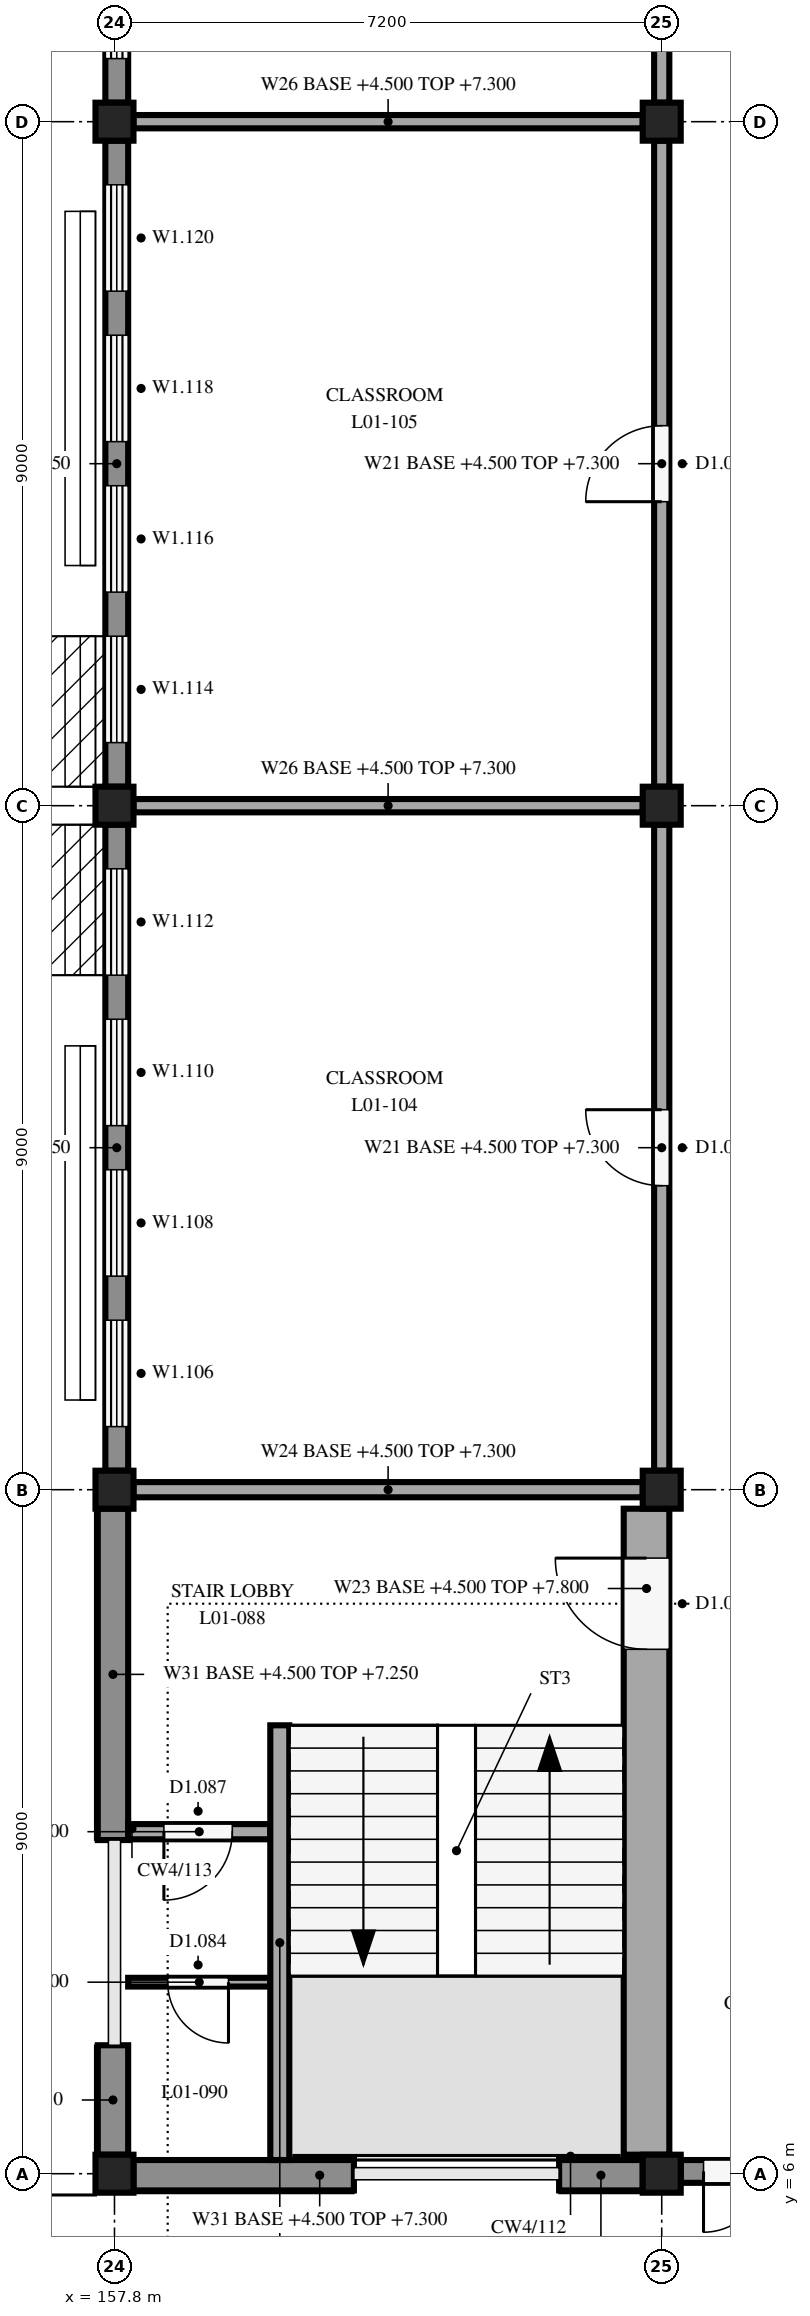
"""IFC4 building model, lengths in metres.
Left out: names, types, materials, properties, quantities, classifications, styles, units other than length and angle.
Written with IfcOpenShell. Run it as: python <this file> out.ifc"""

import sys

from ifc_helpers import new_model, si_unit, direction, frame, frame_2d, origin, origin_2d, place, context, subcontext, project, spatial, rectangle, extrude, element, fill, save


model = new_model("IFC4")
c1 = context("Model", 3, precision=1e-05, world=origin(), true_north=direction((0.0, 1.0)))
c2 = subcontext(c1, "Body", "Model", "MODEL_VIEW")
j1 = project(units=[si_unit("LENGTHUNIT", "METRE"), si_unit("PLANEANGLEUNIT", "RADIAN")], contexts=[c1])
p1 = place(None, origin())
s1 = spatial("IfcSite", under=j1, at=p1, CompositionType="ELEMENT")
p2 = place(p1, origin())
s2 = spatial("IfcBuilding", under=s1, at=p2, CompositionType="ELEMENT")
p3 = place(p2, frame((0.0, 0.0, 4.5)))
s3 = spatial("IfcBuildingStorey", under=s2, at=p3, CompositionType="ELEMENT", Elevation=4.5)
for number, where, z_axis, x_axis in (
    (1, (157.8, 6.0, 0.0), (0.0, 0.0, 1.0), (1.0, 0.0, 0.0)),
    (2, (157.8, 15.0, 0.0), (0.0, 0.0, 1.0), (1.0, 0.0, 0.0)),
    (3, (157.8, 24.0, 0.0), (0.0, 0.0, 1.0), (1.0, 0.0, 0.0)),
    (4, (157.8, 33.0, 0.0), (0.0, 0.0, 1.0), (1.0, 0.0, 0.0)),
    (5, (165.0, 6.0, 0.0), (0.0, 0.0, 1.0), (1.0, 0.0, 0.0)),
    (6, (165.0, 15.0, 0.0), (0.0, 0.0, 1.0), (1.0, 0.0, 0.0)),
    (7, (165.0, 24.0, 0.0), (0.0, 0.0, 1.0), (1.0, 0.0, 0.0)),
    (8, (165.0, 33.0, 0.0), (0.0, 0.0, 1.0), (1.0, 0.0, 0.0)),
):
    element("IfcColumn", number, at=place(p3, frame(where, z_axis=z_axis, x_axis=x_axis)), inside=s3, PredefinedType="COLUMN", context=c2, shape_type="SweptSolid", body=[
        extrude(rectangle(XDim=0.5, YDim=0.5, at=origin_2d()), origin(), (0.0, 0.0, 1.0), 3.3),
    ])
p4 = place(p3, frame((157.78, 6.25, 0.0), z_axis=(0.0, 0.0, 1.0), x_axis=(0.0, 1.0, 0.0)))
e9 = element("IfcWall", 9, at=p4, inside=s3, PredefinedType="STANDARD", context=c2, shape_type="SweptSolid", body=[
    extrude(rectangle(XDim=1.44, YDim=0.4, at=frame_2d((0.72, 0.0))), origin(), (0.0, 0.0, 1.0), 2.75),
])
p5 = place(p3, frame((157.78, 10.39, 0.0), z_axis=(0.0, 0.0, 1.0), x_axis=(0.0, 1.0, 0.0)))
e10 = element("IfcWall", 10, at=p5, inside=s3, PredefinedType="STANDARD", context=c2, shape_type="SweptSolid", body=[
    extrude(rectangle(XDim=4.36, YDim=0.4, at=frame_2d((2.18, 0.0))), origin(), (0.0, 0.0, 1.0), 2.75),
])
p6 = place(p3, frame((157.83, 15.25, 0.0), z_axis=(0.0, 0.0, 1.0), x_axis=(0.0, 1.0, 0.0)))
e11 = element("IfcWall", 11, at=p6, inside=s3, PredefinedType="STANDARD", context=c2, shape_type="SweptSolid", body=[
    extrude(rectangle(XDim=8.5, YDim=0.3, at=frame_2d((4.25, 0.0))), origin(), (0.0, 0.0, 1.0), 2.75),
])
p7 = place(p6, frame((0.58, 0.0, 0.6)))
e12 = element("IfcOpeningElement", 12, at=p7, cuts=e11, PredefinedType="OPENING", context=c2, shape_type="SweptSolid", body=[
    extrude(rectangle(XDim=1.4, YDim=2.1, at=frame_2d((0.7, 1.05))), frame((0.0, 0.16, 0.0), z_axis=(0.0, -1.0, 0.0), x_axis=(1.0, 0.0, 0.0)), (0.0, 0.0, 1.0), 0.32),
])
p8 = place(p6, frame((2.56, 0.0, 0.6)))
e13 = element("IfcOpeningElement", 13, at=p8, cuts=e11, PredefinedType="OPENING", context=c2, shape_type="SweptSolid", body=[
    extrude(rectangle(XDim=1.4, YDim=2.1, at=frame_2d((0.7, 1.05))), frame((0.0, 0.16, 0.0), z_axis=(0.0, -1.0, 0.0), x_axis=(1.0, 0.0, 0.0)), (0.0, 0.0, 1.0), 0.32),
])
p9 = place(p6, frame((4.54, 0.0, 0.6)))
e14 = element("IfcOpeningElement", 14, at=p9, cuts=e11, PredefinedType="OPENING", context=c2, shape_type="SweptSolid", body=[
    extrude(rectangle(XDim=1.4, YDim=2.1, at=frame_2d((0.7, 1.05))), frame((0.0, 0.16, 0.0), z_axis=(0.0, -1.0, 0.0), x_axis=(1.0, 0.0, 0.0)), (0.0, 0.0, 1.0), 0.32),
])
p10 = place(p6, frame((6.52, 0.0, 0.6)))
e15 = element("IfcOpeningElement", 15, at=p10, cuts=e11, PredefinedType="OPENING", context=c2, shape_type="SweptSolid", body=[
    extrude(rectangle(XDim=1.4, YDim=2.1, at=frame_2d((0.7, 1.05))), frame((0.0, 0.16, 0.0), z_axis=(0.0, -1.0, 0.0), x_axis=(1.0, 0.0, 0.0)), (0.0, 0.0, 1.0), 0.32),
])
p11 = place(p3, frame((157.83, 24.25, 0.0), z_axis=(0.0, 0.0, 1.0), x_axis=(0.0, 1.0, 0.0)))
e16 = element("IfcWall", 16, at=p11, inside=s3, PredefinedType="STANDARD", context=c2, shape_type="SweptSolid", body=[
    extrude(rectangle(XDim=8.5, YDim=0.3, at=frame_2d((4.25, 0.0))), origin(), (0.0, 0.0, 1.0), 2.75),
])
p12 = place(p11, frame((0.58, 0.0, 0.6)))
e17 = element("IfcOpeningElement", 17, at=p12, cuts=e16, PredefinedType="OPENING", context=c2, shape_type="SweptSolid", body=[
    extrude(rectangle(XDim=1.4, YDim=2.1, at=frame_2d((0.7, 1.05))), frame((0.0, 0.16, 0.0), z_axis=(0.0, -1.0, 0.0), x_axis=(1.0, 0.0, 0.0)), (0.0, 0.0, 1.0), 0.32),
])
p13 = place(p11, frame((2.56, 0.0, 0.6)))
e18 = element("IfcOpeningElement", 18, at=p13, cuts=e16, PredefinedType="OPENING", context=c2, shape_type="SweptSolid", body=[
    extrude(rectangle(XDim=1.4, YDim=2.1, at=frame_2d((0.7, 1.05))), frame((0.0, 0.16, 0.0), z_axis=(0.0, -1.0, 0.0), x_axis=(1.0, 0.0, 0.0)), (0.0, 0.0, 1.0), 0.32),
])
p14 = place(p11, frame((4.54, 0.0, 0.6)))
e19 = element("IfcOpeningElement", 19, at=p14, cuts=e16, PredefinedType="OPENING", context=c2, shape_type="SweptSolid", body=[
    extrude(rectangle(XDim=1.4, YDim=2.1, at=frame_2d((0.7, 1.05))), frame((0.0, 0.16, 0.0), z_axis=(0.0, -1.0, 0.0), x_axis=(1.0, 0.0, 0.0)), (0.0, 0.0, 1.0), 0.32),
])
p15 = place(p11, frame((6.52, 0.0, 0.6)))
e20 = element("IfcOpeningElement", 20, at=p15, cuts=e16, PredefinedType="OPENING", context=c2, shape_type="SweptSolid", body=[
    extrude(rectangle(XDim=1.4, YDim=2.1, at=frame_2d((0.7, 1.05))), frame((0.0, 0.16, 0.0), z_axis=(0.0, -1.0, 0.0), x_axis=(1.0, 0.0, 0.0)), (0.0, 0.0, 1.0), 0.32),
])
p16 = place(p3, frame((157.83, 33.25, 0.0), z_axis=(0.0, 0.0, 1.0), x_axis=(0.0, 1.0, 0.0)))
e21 = element("IfcWall", 21, at=p16, inside=s3, PredefinedType="STANDARD", context=c2, shape_type="SweptSolid", body=[
    extrude(rectangle(XDim=8.5, YDim=0.3, at=frame_2d((4.25, 0.0))), origin(), (0.0, 0.0, 1.0), 2.75),
])
p17 = place(p16, frame((0.58, 0.0, 0.6)))
e22 = element("IfcOpeningElement", 22, at=p17, cuts=e21, PredefinedType="OPENING", context=c2, shape_type="SweptSolid", body=[
    extrude(rectangle(XDim=1.4, YDim=2.1, at=frame_2d((0.7, 1.05))), frame((0.0, 0.16, 0.0), z_axis=(0.0, -1.0, 0.0), x_axis=(1.0, 0.0, 0.0)), (0.0, 0.0, 1.0), 0.32),
])
p18 = place(p16, frame((2.56, 0.0, 0.6)))
e23 = element("IfcOpeningElement", 23, at=p18, cuts=e21, PredefinedType="OPENING", context=c2, shape_type="SweptSolid", body=[
    extrude(rectangle(XDim=1.4, YDim=2.1, at=frame_2d((0.7, 1.05))), frame((0.0, 0.16, 0.0), z_axis=(0.0, -1.0, 0.0), x_axis=(1.0, 0.0, 0.0)), (0.0, 0.0, 1.0), 0.32),
])
p19 = place(p16, frame((4.54, 0.0, 0.6)))
e24 = element("IfcOpeningElement", 24, at=p19, cuts=e21, PredefinedType="OPENING", context=c2, shape_type="SweptSolid", body=[
    extrude(rectangle(XDim=1.4, YDim=2.1, at=frame_2d((0.7, 1.05))), frame((0.0, 0.16, 0.0), z_axis=(0.0, -1.0, 0.0), x_axis=(1.0, 0.0, 0.0)), (0.0, 0.0, 1.0), 0.32),
])
p20 = place(p16, frame((6.52, 0.0, 0.6)))
e25 = element("IfcOpeningElement", 25, at=p20, cuts=e21, PredefinedType="OPENING", context=c2, shape_type="SweptSolid", body=[
    extrude(rectangle(XDim=1.4, YDim=2.1, at=frame_2d((0.7, 1.05))), frame((0.0, 0.16, 0.0), z_axis=(0.0, -1.0, 0.0), x_axis=(1.0, 0.0, 0.0)), (0.0, 0.0, 1.0), 0.32),
])
p21 = place(p3, frame((160.95, 5.98, 0.0), z_axis=(0.0, 0.0, 1.0), x_axis=(-1.0, 0.0, 0.0)))
e26 = element("IfcWall", 26, at=p21, inside=s3, PredefinedType="STANDARD", context=c2, shape_type="SweptSolid", body=[
    extrude(rectangle(XDim=2.9, YDim=0.4, at=frame_2d((1.45, 0.0))), origin(), (0.0, 0.0, 1.0), 2.8),
])
p22 = place(p3, frame((164.75, 5.98, 0.0), z_axis=(0.0, 0.0, 1.0), x_axis=(-1.0, 0.0, 0.0)))
e27 = element("IfcWall", 27, at=p22, inside=s3, PredefinedType="STANDARD", context=c2, shape_type="SweptSolid", body=[
    extrude(rectangle(XDim=1.1, YDim=0.4, at=frame_2d((0.55, 0.0))), origin(), (0.0, 0.0, 1.0), 2.8),
])
p23 = place(p3, frame((167.45, 6.03, 0.0), z_axis=(0.0, 0.0, 1.0), x_axis=(-1.0, 0.0, 0.0)))
e28 = element("IfcWall", 28, at=p23, inside=s3, PredefinedType="STANDARD", context=c2, shape_type="SweptSolid", body=[
    extrude(rectangle(XDim=2.2, YDim=0.3, at=frame_2d((1.1, 0.0))), origin(), (0.0, 0.0, 1.0), 2.9),
])
p24 = place(p23, frame((0.3, 0.0, 0.0)))
e29 = element("IfcOpeningElement", 29, at=p24, cuts=e28, PredefinedType="OPENING", context=c2, shape_type="SweptSolid", body=[
    extrude(rectangle(XDim=1.6, YDim=2.4, at=frame_2d((0.8, 1.2))), frame((0.0, 0.16, 0.0), z_axis=(0.0, -1.0, 0.0), x_axis=(1.0, 0.0, 0.0)), (0.0, 0.0, 1.0), 0.32),
])
p25 = place(p3, frame((159.975, 6.18, 0.0), z_axis=(0.0, 0.0, 1.0), x_axis=(0.0, 1.0, 0.0)))
e30 = element("IfcWall", 30, at=p25, inside=s3, PredefinedType="SOLIDWALL", context=c2, shape_type="SweptSolid", body=[
    extrude(rectangle(XDim=5.72, YDim=0.25, at=frame_2d((2.86, 0.0))), origin(), (0.0, 0.0, 1.0), 3.3),
])
p26 = place(p3, frame((164.8, 6.25, 0.0), z_axis=(0.0, 0.0, 1.0), x_axis=(0.0, 1.0, 0.0)))
e31 = element("IfcWall", 31, at=p26, inside=s3, PredefinedType="SOLIDWALL", context=c2, shape_type="SweptSolid", body=[
    extrude(rectangle(XDim=8.5, YDim=0.6, at=frame_2d((4.25, 0.0))), origin(), (0.0, 0.0, 1.0), 3.3),
])
p27 = place(p26, frame((6.65, 0.0, 0.0)))
e32 = element("IfcOpeningElement", 32, at=p27, cuts=e31, PredefinedType="OPENING", context=c2, shape_type="SweptSolid", body=[
    extrude(rectangle(XDim=1.2, YDim=2.1, at=frame_2d((0.6, 1.05))), frame((0.0, 0.31, 0.0), z_axis=(0.0, -1.0, 0.0), x_axis=(1.0, 0.0, 0.0)), (0.0, 0.0, 1.0), 0.62),
])
p28 = place(p3, frame((159.85, 10.5, 0.0), z_axis=(0.0, 0.0, 1.0), x_axis=(-1.0, 0.0, 0.0)))
e33 = element("IfcWall", 33, at=p28, inside=s3, PredefinedType="SOLIDWALL", context=c2, shape_type="SweptSolid", body=[
    extrude(rectangle(XDim=1.87, YDim=0.2, at=frame_2d((0.935, 0.0))), origin(), (0.0, 0.0, 1.0), 3.3),
])
p29 = place(p28, frame((0.5, 0.0, 0.0)))
e34 = element("IfcOpeningElement", 34, at=p29, cuts=e33, PredefinedType="OPENING", context=c2, shape_type="SweptSolid", body=[
    extrude(rectangle(XDim=0.9, YDim=2.1, at=frame_2d((0.45, 1.05))), frame((0.0, 0.11, 0.0), z_axis=(0.0, -1.0, 0.0), x_axis=(1.0, 0.0, 0.0)), (0.0, 0.0, 1.0), 0.22),
])
p30 = place(p3, frame((159.85, 8.52, 0.0), z_axis=(0.0, 0.0, 1.0), x_axis=(-1.0, 0.0, 0.0)))
e35 = element("IfcWall", 35, at=p30, inside=s3, PredefinedType="PARTITIONING", context=c2, shape_type="SweptSolid", body=[
    extrude(rectangle(XDim=1.87, YDim=0.115, at=frame_2d((0.935, 0.0))), origin(), (0.0, 0.0, 1.0), 3.3),
])
p31 = place(p30, frame((0.55, 0.0, 0.0)))
e36 = element("IfcOpeningElement", 36, at=p31, cuts=e35, PredefinedType="OPENING", context=c2, shape_type="SweptSolid", body=[
    extrude(rectangle(XDim=0.8, YDim=2.1, at=frame_2d((0.4, 1.05))), frame((0.0, 0.067, 0.0), z_axis=(0.0, -1.0, 0.0), x_axis=(1.0, 0.0, 0.0)), (0.0, 0.0, 1.0), 0.135),
])
p32 = place(p3, frame((158.05, 15.0, 0.0), z_axis=(0.0, 0.0, 1.0), x_axis=(1.0, 0.0, 0.0)))
e37 = element("IfcWall", 37, at=p32, inside=s3, PredefinedType="SOLIDWALL", context=c2, shape_type="SweptSolid", body=[
    extrude(rectangle(XDim=6.7, YDim=0.2, at=frame_2d((3.35, 0.0))), origin(), (0.0, 0.0, 1.0), 2.8),
])
p33 = place(p3, frame((165.0, 15.25, 0.0), z_axis=(0.0, 0.0, 1.0), x_axis=(0.0, 1.0, 0.0)))
e38 = element("IfcWall", 38, at=p33, inside=s3, PredefinedType="PARTITIONING", context=c2, shape_type="SweptSolid", body=[
    extrude(rectangle(XDim=8.5, YDim=0.2, at=frame_2d((4.25, 0.0))), origin(), (0.0, 0.0, 1.0), 2.8),
])
p34 = place(p33, frame((3.75, 0.0, 0.0)))
e39 = element("IfcOpeningElement", 39, at=p34, cuts=e38, PredefinedType="OPENING", context=c2, shape_type="SweptSolid", body=[
    extrude(rectangle(XDim=1.0, YDim=2.1, at=frame_2d((0.5, 1.05))), frame((0.0, 0.11, 0.0), z_axis=(0.0, -1.0, 0.0), x_axis=(1.0, 0.0, 0.0)), (0.0, 0.0, 1.0), 0.22),
])
p35 = place(p3, frame((165.0, 24.25, 0.0), z_axis=(0.0, 0.0, 1.0), x_axis=(0.0, 1.0, 0.0)))
e40 = element("IfcWall", 40, at=p35, inside=s3, PredefinedType="PARTITIONING", context=c2, shape_type="SweptSolid", body=[
    extrude(rectangle(XDim=8.5, YDim=0.2, at=frame_2d((4.25, 0.0))), origin(), (0.0, 0.0, 1.0), 2.8),
])
p36 = place(p35, frame((3.75, 0.0, 0.0)))
e41 = element("IfcOpeningElement", 41, at=p36, cuts=e40, PredefinedType="OPENING", context=c2, shape_type="SweptSolid", body=[
    extrude(rectangle(XDim=1.0, YDim=2.1, at=frame_2d((0.5, 1.05))), frame((0.0, 0.11, 0.0), z_axis=(0.0, -1.0, 0.0), x_axis=(1.0, 0.0, 0.0)), (0.0, 0.0, 1.0), 0.22),
])
p37 = place(p3, frame((165.0, 33.25, 0.0), z_axis=(0.0, 0.0, 1.0), x_axis=(0.0, 1.0, 0.0)))
e42 = element("IfcWall", 42, at=p37, inside=s3, PredefinedType="PARTITIONING", context=c2, shape_type="SweptSolid", body=[
    extrude(rectangle(XDim=8.5, YDim=0.2, at=frame_2d((4.25, 0.0))), origin(), (0.0, 0.0, 1.0), 2.8),
])
p38 = place(p37, frame((3.75, 0.0, 0.0)))
e43 = element("IfcOpeningElement", 43, at=p38, cuts=e42, PredefinedType="OPENING", context=c2, shape_type="SweptSolid", body=[
    extrude(rectangle(XDim=1.0, YDim=2.1, at=frame_2d((0.5, 1.05))), frame((0.0, 0.11, 0.0), z_axis=(0.0, -1.0, 0.0), x_axis=(1.0, 0.0, 0.0)), (0.0, 0.0, 1.0), 0.22),
])
for number, where, z_axis, x_axis in (
    (44, (158.05, 24.0, 0.0), (0.0, 0.0, 1.0), (1.0, 0.0, 0.0)),
    (45, (158.05, 33.0, 0.0), (0.0, 0.0, 1.0), (1.0, 0.0, 0.0)),
):
    element("IfcWall", number, at=place(p3, frame(where, z_axis=z_axis, x_axis=x_axis)), inside=s3, PredefinedType="PARTITIONING", context=c2, shape_type="SweptSolid", body=[
        extrude(rectangle(XDim=6.7, YDim=0.175, at=frame_2d((3.35, 0.0))), origin(), (0.0, 0.0, 1.0), 2.8),
    ])
p39 = place(p7, origin())
e46 = element("IfcWindow", 46, at=p39, inside=s3, PartitioningType="DOUBLE_PANEL_VERTICAL", PredefinedType="WINDOW", context=c2, shape_type="SweptSolid", body=[
    extrude(rectangle(XDim=1.4, YDim=2.1, at=frame_2d((0.7, 1.05))), frame((0.0, 0.03, 0.0), z_axis=(0.0, -1.0, 0.0), x_axis=(1.0, 0.0, 0.0)), (0.0, 0.0, 1.0), 0.06),
])
fill(e12, e46)
p40 = place(p8, origin())
e47 = element("IfcWindow", 47, at=p40, inside=s3, PartitioningType="DOUBLE_PANEL_VERTICAL", PredefinedType="WINDOW", context=c2, shape_type="SweptSolid", body=[
    extrude(rectangle(XDim=1.4, YDim=2.1, at=frame_2d((0.7, 1.05))), frame((0.0, 0.03, 0.0), z_axis=(0.0, -1.0, 0.0), x_axis=(1.0, 0.0, 0.0)), (0.0, 0.0, 1.0), 0.06),
])
fill(e13, e47)
p41 = place(p9, origin())
e48 = element("IfcWindow", 48, at=p41, inside=s3, PartitioningType="DOUBLE_PANEL_VERTICAL", PredefinedType="WINDOW", context=c2, shape_type="SweptSolid", body=[
    extrude(rectangle(XDim=1.4, YDim=2.1, at=frame_2d((0.7, 1.05))), frame((0.0, 0.03, 0.0), z_axis=(0.0, -1.0, 0.0), x_axis=(1.0, 0.0, 0.0)), (0.0, 0.0, 1.0), 0.06),
])
fill(e14, e48)
p42 = place(p10, origin())
e49 = element("IfcWindow", 49, at=p42, inside=s3, PartitioningType="DOUBLE_PANEL_VERTICAL", PredefinedType="WINDOW", context=c2, shape_type="SweptSolid", body=[
    extrude(rectangle(XDim=1.4, YDim=2.1, at=frame_2d((0.7, 1.05))), frame((0.0, 0.03, 0.0), z_axis=(0.0, -1.0, 0.0), x_axis=(1.0, 0.0, 0.0)), (0.0, 0.0, 1.0), 0.06),
])
fill(e15, e49)
p43 = place(p12, origin())
e50 = element("IfcWindow", 50, at=p43, inside=s3, PartitioningType="DOUBLE_PANEL_VERTICAL", PredefinedType="WINDOW", context=c2, shape_type="SweptSolid", body=[
    extrude(rectangle(XDim=1.4, YDim=2.1, at=frame_2d((0.7, 1.05))), frame((0.0, 0.03, 0.0), z_axis=(0.0, -1.0, 0.0), x_axis=(1.0, 0.0, 0.0)), (0.0, 0.0, 1.0), 0.06),
])
fill(e17, e50)
p44 = place(p13, origin())
e51 = element("IfcWindow", 51, at=p44, inside=s3, PartitioningType="DOUBLE_PANEL_VERTICAL", PredefinedType="WINDOW", context=c2, shape_type="SweptSolid", body=[
    extrude(rectangle(XDim=1.4, YDim=2.1, at=frame_2d((0.7, 1.05))), frame((0.0, 0.03, 0.0), z_axis=(0.0, -1.0, 0.0), x_axis=(1.0, 0.0, 0.0)), (0.0, 0.0, 1.0), 0.06),
])
fill(e18, e51)
p45 = place(p14, origin())
e52 = element("IfcWindow", 52, at=p45, inside=s3, PartitioningType="DOUBLE_PANEL_VERTICAL", PredefinedType="WINDOW", context=c2, shape_type="SweptSolid", body=[
    extrude(rectangle(XDim=1.4, YDim=2.1, at=frame_2d((0.7, 1.05))), frame((0.0, 0.03, 0.0), z_axis=(0.0, -1.0, 0.0), x_axis=(1.0, 0.0, 0.0)), (0.0, 0.0, 1.0), 0.06),
])
fill(e19, e52)
p46 = place(p15, origin())
e53 = element("IfcWindow", 53, at=p46, inside=s3, PartitioningType="DOUBLE_PANEL_VERTICAL", PredefinedType="WINDOW", context=c2, shape_type="SweptSolid", body=[
    extrude(rectangle(XDim=1.4, YDim=2.1, at=frame_2d((0.7, 1.05))), frame((0.0, 0.03, 0.0), z_axis=(0.0, -1.0, 0.0), x_axis=(1.0, 0.0, 0.0)), (0.0, 0.0, 1.0), 0.06),
])
fill(e20, e53)
p47 = place(p17, origin())
e54 = element("IfcWindow", 54, at=p47, inside=s3, PartitioningType="DOUBLE_PANEL_VERTICAL", PredefinedType="WINDOW", context=c2, shape_type="SweptSolid", body=[
    extrude(rectangle(XDim=1.4, YDim=2.1, at=frame_2d((0.7, 1.05))), frame((0.0, 0.03, 0.0), z_axis=(0.0, -1.0, 0.0), x_axis=(1.0, 0.0, 0.0)), (0.0, 0.0, 1.0), 0.06),
])
fill(e22, e54)
p48 = place(p24, origin())
e55 = element("IfcDoor", 55, at=p48, inside=s3, OperationType="DOUBLE_DOOR_SINGLE_SWING", PredefinedType="DOOR", context=c2, shape_type="SweptSolid", body=[
    extrude(rectangle(XDim=1.6, YDim=2.4, at=frame_2d((0.8, 1.2))), frame((0.0, 0.025, 0.0), z_axis=(0.0, -1.0, 0.0), x_axis=(1.0, 0.0, 0.0)), (0.0, 0.0, 1.0), 0.05),
])
fill(e29, e55)
p49 = place(p27, origin())
e56 = element("IfcDoor", 56, at=p49, inside=s3, OperationType="SINGLE_SWING_RIGHT", PredefinedType="DOOR", context=c2, shape_type="SweptSolid", body=[
    extrude(rectangle(XDim=1.2, YDim=2.1, at=frame_2d((0.6, 1.05))), frame((0.0, 0.025, 0.0), z_axis=(0.0, -1.0, 0.0), x_axis=(1.0, 0.0, 0.0)), (0.0, 0.0, 1.0), 0.05),
])
fill(e32, e56)
p50 = place(p29, origin())
e57 = element("IfcDoor", 57, at=p50, inside=s3, OperationType="SINGLE_SWING_RIGHT", PredefinedType="DOOR", context=c2, shape_type="SweptSolid", body=[
    extrude(rectangle(XDim=0.9, YDim=2.1, at=frame_2d((0.45, 1.05))), frame((0.0, 0.025, 0.0), z_axis=(0.0, -1.0, 0.0), x_axis=(1.0, 0.0, 0.0)), (0.0, 0.0, 1.0), 0.05),
])
fill(e34, e57)
p51 = place(p31, origin())
e58 = element("IfcDoor", 58, at=p51, inside=s3, OperationType="SINGLE_SWING_LEFT", PredefinedType="DOOR", context=c2, shape_type="SweptSolid", body=[
    extrude(rectangle(XDim=0.8, YDim=2.1, at=frame_2d((0.4, 1.05))), frame((0.0, 0.025, 0.0), z_axis=(0.0, -1.0, 0.0), x_axis=(1.0, 0.0, 0.0)), (0.0, 0.0, 1.0), 0.05),
])
fill(e36, e58)
p52 = place(p34, origin())
e59 = element("IfcDoor", 59, at=p52, inside=s3, OperationType="SINGLE_SWING_RIGHT", PredefinedType="DOOR", context=c2, shape_type="SweptSolid", body=[
    extrude(rectangle(XDim=1.0, YDim=2.1, at=frame_2d((0.5, 1.05))), frame((0.0, 0.025, 0.0), z_axis=(0.0, -1.0, 0.0), x_axis=(1.0, 0.0, 0.0)), (0.0, 0.0, 1.0), 0.05),
])
fill(e39, e59)
p53 = place(p36, origin())
e60 = element("IfcDoor", 60, at=p53, inside=s3, OperationType="SINGLE_SWING_LEFT", PredefinedType="DOOR", context=c2, shape_type="SweptSolid", body=[
    extrude(rectangle(XDim=1.0, YDim=2.1, at=frame_2d((0.5, 1.05))), frame((0.0, 0.025, 0.0), z_axis=(0.0, -1.0, 0.0), x_axis=(1.0, 0.0, 0.0)), (0.0, 0.0, 1.0), 0.05),
])
fill(e41, e60)
save(model, sys.argv[1])
